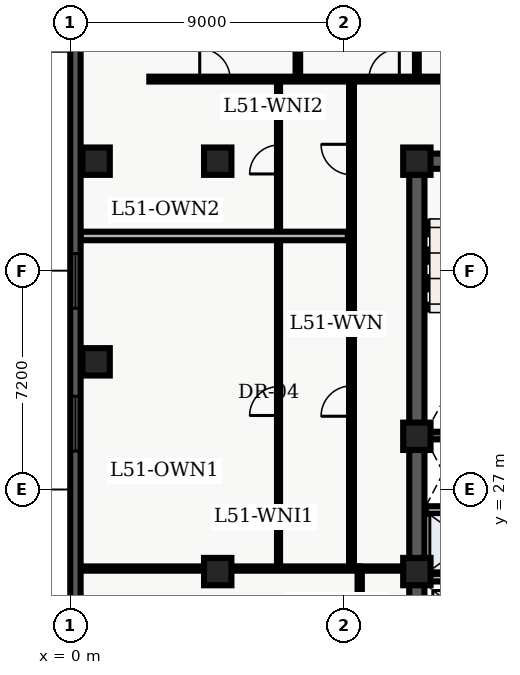
"""IFC4 building model, lengths in metres.
Left out: names, types, materials, properties, quantities, classifications, styles, units other than length and angle.
Written with IfcOpenShell. Run it as: python <this file> out.ifc"""

import sys

from ifc_helpers import new_model, entity, si_unit, converted_unit, direction, frame, origin_with_axes, origin_2d_with_axis, place, context, subcontext, project, spatial, polyline, rectangle, outline, extrude, element, fill, save


model = new_model("IFC4")
c1 = context("Model", 3, precision=1e-05, world=origin_with_axes(), true_north=direction((0.0, 1.0)))
c2 = subcontext(c1, "Body", "Model", "MODEL_VIEW")
j1 = project(units=[si_unit("LENGTHUNIT", "METRE"), converted_unit("PLANEANGLEUNIT", "DEGREE", entity("IfcPlaneAngleMeasure", 0.017), si_unit("PLANEANGLEUNIT", "RADIAN"), dimensions=[0, 0, 0, 0, 0, 0, 0])], contexts=[c1])
p1 = place(None, origin_with_axes())
s1 = spatial("IfcSite", under=j1, at=p1, CompositionType="ELEMENT")
p2 = place(p1, origin_with_axes())
s2 = spatial("IfcBuilding", under=s1, at=p2, CompositionType="ELEMENT")
p3 = place(p2, frame((0.0, 0.0, 208.2), z_axis=(0.0, 0.0, 1.0), x_axis=(1.0, 0.0, 0.0)))
s3 = spatial("IfcBuildingStorey", under=s2, at=p3, CompositionType="ELEMENT", Elevation=208.2)
p4 = place(p3, frame((11.4, 10.8, 0.0), z_axis=(0.0, 0.0, 1.0), x_axis=(0.0, 1.0, 0.0)))
e1 = element("IfcWall", 1, at=p4, inside=s3, PredefinedType="SHEAR", context=c2, shape_type="SweptSolid", body=[
    extrude(outline(polyline([(0.0, -0.25), (27.0, -0.25), (27.0, 0.25), (0.0, 0.25), (0.0, -0.25)])), origin_with_axes(), (0.0, 0.0, 1.0), 3.66),
])
p5 = place(p3, frame((11.4, 37.8, 0.0), z_axis=(0.0, 0.0, 1.0), x_axis=(1.0, 0.0, 0.0)))
e2 = element("IfcWall", 2, at=p5, inside=s3, PredefinedType="SHEAR", context=c2, shape_type="SweptSolid", body=[
    extrude(outline(polyline([(0.0, -0.25), (7.2, -0.25), (7.2, 0.25), (0.0, 0.25), (0.0, -0.25)])), origin_with_axes(), (0.0, 0.0, 1.0), 3.66),
])
p6 = place(p5, frame((2.625, 0.0, 0.0), z_axis=(0.0, 0.0, 1.0), x_axis=(1.0, 0.0, 0.0)))
e3 = element("IfcOpeningElement", 3, at=p6, cuts=e2, PredefinedType="OPENING", context=c2, shape_type="SweptSolid", body=[
    extrude(rectangle(XDim=1.05, YDim=0.52, at=origin_2d_with_axis()), origin_with_axes(), (0.0, 0.0, 1.0), 2.15),
])
p7 = place(p3, frame((11.65, 28.775, 0.0), z_axis=(0.0, 0.0, 1.0), x_axis=(1.0, 0.0, 0.0)))
e4 = element("IfcWall", 4, at=p7, inside=s3, PredefinedType="SHEAR", context=c2, shape_type="SweptSolid", body=[
    extrude(outline(polyline([(0.0, -0.125), (6.7, -0.125), (6.7, 0.125), (0.0, 0.125), (0.0, -0.125)])), origin_with_axes(), (0.0, 0.0, 1.0), 3.66),
])
p8 = place(p3, frame((11.7, 24.1, 0.0), z_axis=(0.0, 0.0, 1.0), x_axis=(1.0, 0.0, 0.0)))
e5 = element("IfcWall", 5, at=p8, inside=s3, PredefinedType="SOLIDWALL", context=c2, shape_type="SweptSolid", body=[
    extrude(outline(polyline([(0.0, -0.125), (6.6, -0.125), (6.6, 0.125), (0.0, 0.125), (0.0, -0.125)])), origin_with_axes(), (0.0, 0.0, 1.0), 2.7),
])
p9 = place(p8, frame((3.6, 0.0, 0.0), z_axis=(0.0, 0.0, 1.0), x_axis=(1.0, 0.0, 0.0)))
e6 = element("IfcOpeningElement", 6, at=p9, cuts=e5, PredefinedType="OPENING", context=c2, shape_type="SweptSolid", body=[
    extrude(rectangle(XDim=0.9, YDim=0.27, at=origin_2d_with_axis()), origin_with_axes(), (0.0, 0.0, 1.0), 2.15),
])
p10 = place(p8, frame((5.65, 0.0, 0.0), z_axis=(0.0, 0.0, 1.0), x_axis=(1.0, 0.0, 0.0)))
e7 = element("IfcOpeningElement", 7, at=p10, cuts=e5, PredefinedType="OPENING", context=c2, shape_type="SweptSolid", body=[
    extrude(rectangle(XDim=0.9, YDim=0.27, at=origin_2d_with_axis()), origin_with_axes(), (0.0, 0.0, 1.0), 2.15),
])
p11 = place(p3, frame((11.7, 26.325, 0.0), z_axis=(0.0, 0.0, 1.0), x_axis=(1.0, 0.0, 0.0)))
e8 = element("IfcWall", 8, at=p11, inside=s3, PredefinedType="SOLIDWALL", context=c2, shape_type="SweptSolid", body=[
    extrude(outline(polyline([(0.0, -0.125), (6.6, -0.125), (6.6, 0.125), (0.0, 0.125), (0.0, -0.125)])), origin_with_axes(), (0.0, 0.0, 1.0), 2.7),
])
p12 = place(p11, frame((3.5, 0.0, 0.0), z_axis=(0.0, 0.0, 1.0), x_axis=(1.0, 0.0, 0.0)))
e9 = element("IfcOpeningElement", 9, at=p12, cuts=e8, PredefinedType="OPENING", context=c2, shape_type="SweptSolid", body=[
    extrude(rectangle(XDim=0.9, YDim=0.27, at=origin_2d_with_axis()), origin_with_axes(), (0.0, 0.0, 1.0), 2.15),
])
for number, where, z_axis, x_axis in (
    (10, (11.4, 24.3, 0.0), (0.0, 0.0, 1.0), (1.0, 0.0, 0.0)),
    (11, (11.4, 28.75, 0.0), (0.0, 0.0, 1.0), (1.0, 0.0, 0.0)),
    (12, (11.4, 37.8, 0.0), (0.0, 0.0, 1.0), (1.0, 0.0, 0.0)),
    (13, (4.85, 24.3, 0.0), (0.0, 0.0, 1.0), (1.0, 0.0, 0.0)),
    (14, (4.85, 37.8, 0.0), (0.0, 0.0, 1.0), (1.0, 0.0, 0.0)),
    (15, (0.85, 31.2, 0.0), (0.0, 0.0, 1.0), (1.0, 0.0, 0.0)),
    (16, (0.85, 37.8, 0.0), (0.0, 0.0, 1.0), (1.0, 0.0, 0.0)),
):
    element("IfcColumn", number, at=place(p3, frame(where, z_axis=z_axis, x_axis=x_axis)), inside=s3, PredefinedType="COLUMN", context=c2, shape_type="SweptSolid", body=[
        extrude(rectangle(XDim=0.9, YDim=0.9, at=origin_2d_with_axis()), origin_with_axes(), (0.0, 0.0, 1.0), 3.9),
    ])
p13 = place(p3, frame((9.52, 20.4, 0.0), z_axis=(0.0, 0.0, 1.0), x_axis=(0.0, 1.0, 0.0)))
e17 = element("IfcWall", 17, at=p13, inside=s3, PredefinedType="PARTITIONING", context=c2, shape_type="SweptSolid", body=[
    extrude(outline(polyline([(0.0, -0.07), (4.0, -0.07), (4.0, 0.07), (0.0, 0.07), (0.0, -0.07)])), origin_with_axes(), (0.0, 0.0, 1.0), 2.7),
])
p14 = place(p3, frame((9.52, 24.4, 0.0), z_axis=(0.0, 0.0, 1.0), x_axis=(1.0, 0.0, 0.0)))
e18 = element("IfcWall", 18, at=p14, inside=s3, PredefinedType="PARTITIONING", context=c2, shape_type="SweptSolid", body=[
    extrude(outline(polyline([(0.0, -0.07), (1.58, -0.07), (1.58, 0.07), (0.0, 0.07), (0.0, -0.07)])), origin_with_axes(), (0.0, 0.0, 1.0), 2.7),
])
p15 = place(p3, frame((2.6, 40.5, 0.0), z_axis=(0.0, 0.0, 1.0), x_axis=(1.0, 0.0, 0.0)))
e19 = element("IfcWall", 19, at=p15, inside=s3, PredefinedType="PARTITIONING", context=c2, shape_type="SweptSolid", body=[
    extrude(outline(polyline([(0.0, -0.08), (27.751, -0.08), (27.751, 0.08), (0.0, 0.08), (0.0, -0.08)])), origin_with_axes(), (0.0, 0.0, 1.0), 2.7),
])
p16 = place(p15, frame((2.158, 0.0, 0.0), z_axis=(0.0, 0.0, 1.0), x_axis=(1.0, 0.0, 0.0)))
e20 = element("IfcOpeningElement", 20, at=p16, cuts=e19, PredefinedType="OPENING", context=c2, shape_type="SweptSolid", body=[
    extrude(rectangle(XDim=1.0, YDim=0.18, at=origin_2d_with_axis()), origin_with_axes(), (0.0, 0.0, 1.0), 2.15),
])
p17 = place(p15, frame((7.723, 0.0, 0.0), z_axis=(0.0, 0.0, 1.0), x_axis=(1.0, 0.0, 0.0)))
e21 = element("IfcOpeningElement", 21, at=p17, cuts=e19, PredefinedType="OPENING", context=c2, shape_type="SweptSolid", body=[
    extrude(rectangle(XDim=1.0, YDim=0.18, at=origin_2d_with_axis()), origin_with_axes(), (0.0, 0.0, 1.0), 2.15),
])
p18 = place(p15, frame((11.266, 0.0, 0.0), z_axis=(0.0, 0.0, 1.0), x_axis=(1.0, 0.0, 0.0)))
e22 = element("IfcOpeningElement", 22, at=p18, cuts=e19, PredefinedType="OPENING", context=c2, shape_type="SweptSolid", body=[
    extrude(rectangle(XDim=1.0, YDim=0.18, at=origin_2d_with_axis()), origin_with_axes(), (0.0, 0.0, 1.0), 2.15),
])
p19 = place(p15, frame((15.626, 0.0, 0.0), z_axis=(0.0, 0.0, 1.0), x_axis=(1.0, 0.0, 0.0)))
e23 = element("IfcOpeningElement", 23, at=p19, cuts=e19, PredefinedType="OPENING", context=c2, shape_type="SweptSolid", body=[
    extrude(rectangle(XDim=1.0, YDim=0.18, at=origin_2d_with_axis()), origin_with_axes(), (0.0, 0.0, 1.0), 2.15),
])
p20 = place(p3, frame((9.25, 24.4, 0.0), z_axis=(0.0, 0.0, 1.0), x_axis=(0.0, 1.0, 0.0)))
e24 = element("IfcWall", 24, at=p20, inside=s3, PredefinedType="PARTITIONING", context=c2, shape_type="SweptSolid", body=[
    extrude(outline(polyline([(0.0, -0.08), (16.1, -0.08), (16.1, 0.08), (0.0, 0.08), (0.0, -0.08)])), origin_with_axes(), (0.0, 0.0, 1.0), 2.7),
])
p21 = place(p20, frame((5.51, 0.0, 0.0), z_axis=(0.0, 0.0, 1.0), x_axis=(1.0, 0.0, 0.0)))
e25 = element("IfcOpeningElement", 25, at=p21, cuts=e24, PredefinedType="OPENING", context=c2, shape_type="SweptSolid", body=[
    extrude(rectangle(XDim=1.0, YDim=0.18, at=origin_2d_with_axis()), origin_with_axes(), (0.0, 0.0, 1.0), 2.15),
])
p22 = place(p20, frame((13.455, 0.0, 0.0), z_axis=(0.0, 0.0, 1.0), x_axis=(1.0, 0.0, 0.0)))
e26 = element("IfcOpeningElement", 26, at=p22, cuts=e24, PredefinedType="OPENING", context=c2, shape_type="SweptSolid", body=[
    extrude(rectangle(XDim=1.0, YDim=0.18, at=origin_2d_with_axis()), origin_with_axes(), (0.0, 0.0, 1.0), 2.15),
])
p23 = place(p3, frame((0.335, 24.4, 0.0), z_axis=(0.0, 0.0, 1.0), x_axis=(1.0, 0.0, 0.0)))
e27 = element("IfcWall", 27, at=p23, inside=s3, PredefinedType="PARTITIONING", context=c2, shape_type="SweptSolid", body=[
    extrude(outline(polyline([(0.0, -0.07), (9.185, -0.07), (9.185, 0.07), (0.0, 0.07), (0.0, -0.07)])), origin_with_axes(), (0.0, 0.0, 1.0), 2.7),
])
p24 = place(p3, frame((6.85, 24.55, 0.0), z_axis=(0.0, 0.0, 1.0), x_axis=(0.0, 1.0, 0.0)))
e28 = element("IfcWall", 28, at=p24, inside=s3, PredefinedType="PARTITIONING", context=c2, shape_type="SweptSolid", body=[
    extrude(outline(polyline([(0.0, -0.05), (15.75, -0.05), (15.75, 0.05), (0.0, 0.05), (0.0, -0.05)])), origin_with_axes(), (0.0, 0.0, 1.0), 2.7),
])
p25 = place(p24, frame((5.36, 0.0, 0.0), z_axis=(0.0, 0.0, 1.0), x_axis=(1.0, 0.0, 0.0)))
e29 = element("IfcOpeningElement", 29, at=p25, cuts=e28, PredefinedType="OPENING", context=c2, shape_type="SweptSolid", body=[
    extrude(rectangle(XDim=0.95, YDim=0.12, at=origin_2d_with_axis()), origin_with_axes(), (0.0, 0.0, 1.0), 2.15),
])
p26 = place(p24, frame((13.305, 0.0, 0.0), z_axis=(0.0, 0.0, 1.0), x_axis=(1.0, 0.0, 0.0)))
e30 = element("IfcOpeningElement", 30, at=p26, cuts=e28, PredefinedType="OPENING", context=c2, shape_type="SweptSolid", body=[
    extrude(rectangle(XDim=0.95, YDim=0.12, at=origin_2d_with_axis()), origin_with_axes(), (0.0, 0.0, 1.0), 2.15),
])
p27 = place(p3, frame((0.335, 35.34, 0.0), z_axis=(0.0, 0.0, 1.0), x_axis=(1.0, 0.0, 0.0)))
e31 = element("IfcWall", 31, at=p27, inside=s3, PredefinedType="PARTITIONING", context=c2, shape_type="SweptSolid", body=[
    extrude(outline(polyline([(0.0, -0.14), (8.795, -0.14), (8.795, 0.14), (0.0, 0.14), (0.0, -0.14)])), origin_with_axes(), (0.0, 0.0, 1.0), 2.7),
])
p28 = place(p3, frame((7.486, 40.6, 0.0), z_axis=(0.0, 0.0, 1.0), x_axis=(0.0, 1.0, 0.0)))
e32 = element("IfcWall", 32, at=p28, inside=s3, PredefinedType="PARTITIONING", context=c2, shape_type="SweptSolid", body=[
    extrude(outline(polyline([(0.0, -0.075), (7.665, -0.075), (7.665, 0.075), (0.0, 0.075), (0.0, -0.075)])), origin_with_axes(), (0.0, 0.0, 1.0), 2.7),
])
p29 = place(p3, frame((11.4, 40.6, 0.0), z_axis=(0.0, 0.0, 1.0), x_axis=(0.0, 1.0, 0.0)))
e33 = element("IfcWall", 33, at=p29, inside=s3, PredefinedType="PARTITIONING", context=c2, shape_type="SweptSolid", body=[
    extrude(outline(polyline([(0.0, -0.062), (7.665, -0.062), (7.665, 0.062), (0.0, 0.062), (0.0, -0.062)])), origin_with_axes(), (0.0, 0.0, 1.0), 2.7),
])
p30 = place(p3, frame((0.17, 2.74, 0.0), z_axis=(0.0, 0.0, 1.0), x_axis=(0.0, 1.0, 0.0)))
e34 = element("IfcWall", 34, at=p30, inside=s3, PredefinedType="SOLIDWALL", context=c2, shape_type="SweptSolid", body=[
    extrude(outline(polyline([(0.0, -0.17), (43.46, -0.17), (43.46, 0.17), (0.0, 0.17), (0.0, -0.17)])), origin_with_axes(), (0.0, 0.0, 1.0), 3.66),
])
p31 = place(p30, frame((2.948, 0.0, 0.45), z_axis=(0.0, 0.0, 1.0), x_axis=(1.0, 0.0, 0.0)))
e35 = element("IfcOpeningElement", 35, at=p31, cuts=e34, PredefinedType="OPENING", context=c2, shape_type="SweptSolid", body=[
    extrude(rectangle(XDim=1.8, YDim=0.36, at=origin_2d_with_axis()), origin_with_axes(), (0.0, 0.0, 1.0), 2.1),
])
p32 = place(p30, frame((12.339, 0.0, 0.45), z_axis=(0.0, 0.0, 1.0), x_axis=(1.0, 0.0, 0.0)))
e36 = element("IfcOpeningElement", 36, at=p32, cuts=e34, PredefinedType="OPENING", context=c2, shape_type="SweptSolid", body=[
    extrude(rectangle(XDim=1.8, YDim=0.36, at=origin_2d_with_axis()), origin_with_axes(), (0.0, 0.0, 1.0), 2.1),
])
p33 = place(p30, frame((26.426, 0.0, 0.45), z_axis=(0.0, 0.0, 1.0), x_axis=(1.0, 0.0, 0.0)))
e37 = element("IfcOpeningElement", 37, at=p33, cuts=e34, PredefinedType="OPENING", context=c2, shape_type="SweptSolid", body=[
    extrude(rectangle(XDim=1.8, YDim=0.36, at=origin_2d_with_axis()), origin_with_axes(), (0.0, 0.0, 1.0), 2.1),
])
p34 = place(p30, frame((31.121, 0.0, 0.45), z_axis=(0.0, 0.0, 1.0), x_axis=(1.0, 0.0, 0.0)))
e38 = element("IfcOpeningElement", 38, at=p34, cuts=e34, PredefinedType="OPENING", context=c2, shape_type="SweptSolid", body=[
    extrude(rectangle(XDim=1.8, YDim=0.36, at=origin_2d_with_axis()), origin_with_axes(), (0.0, 0.0, 1.0), 2.1),
])
p35 = place(p30, frame((40.062, 0.0, 0.45), z_axis=(0.0, 0.0, 1.0), x_axis=(1.0, 0.0, 0.0)))
e39 = element("IfcOpeningElement", 39, at=p35, cuts=e34, PredefinedType="OPENING", context=c2, shape_type="SweptSolid", body=[
    extrude(rectangle(XDim=1.8, YDim=0.36, at=origin_2d_with_axis()), origin_with_axes(), (0.0, 0.0, 1.0), 2.1),
])
p36 = place(p24, frame((5.36, 0.0, 0.0), z_axis=(0.0, 0.0, 1.0), x_axis=(1.0, 0.0, 0.0)))
e40 = element("IfcDoor", 40, at=p36, inside=s3, OperationType="SINGLE_SWING_LEFT", PredefinedType="DOOR", context=c2, shape_type="SweptSolid", body=[
    extrude(rectangle(XDim=0.95, YDim=0.06, at=origin_2d_with_axis()), origin_with_axes(), (0.0, 0.0, 1.0), 2.15),
])
fill(e29, e40)
p37 = place(p20, frame((5.51, 0.0, 0.0), z_axis=(0.0, 0.0, 1.0), x_axis=(1.0, 0.0, 0.0)))
e41 = element("IfcDoor", 41, at=p37, inside=s3, OperationType="SINGLE_SWING_LEFT", PredefinedType="DOOR", context=c2, shape_type="SweptSolid", body=[
    extrude(rectangle(XDim=1.0, YDim=0.09, at=origin_2d_with_axis()), origin_with_axes(), (0.0, 0.0, 1.0), 2.15),
])
fill(e25, e41)
p38 = place(p24, frame((13.305, 0.0, 0.0), z_axis=(0.0, 0.0, 1.0), x_axis=(1.0, 0.0, 0.0)))
e42 = element("IfcDoor", 42, at=p38, inside=s3, OperationType="SINGLE_SWING_LEFT", PredefinedType="DOOR", context=c2, shape_type="SweptSolid", body=[
    extrude(rectangle(XDim=0.95, YDim=0.06, at=origin_2d_with_axis()), origin_with_axes(), (0.0, 0.0, 1.0), 2.15),
])
fill(e30, e42)
p39 = place(p20, frame((13.455, 0.0, 0.0), z_axis=(0.0, 0.0, 1.0), x_axis=(1.0, 0.0, 0.0)))
e43 = element("IfcDoor", 43, at=p39, inside=s3, OperationType="SINGLE_SWING_RIGHT", PredefinedType="DOOR", context=c2, shape_type="SweptSolid", body=[
    extrude(rectangle(XDim=1.0, YDim=0.09, at=origin_2d_with_axis()), origin_with_axes(), (0.0, 0.0, 1.0), 2.15),
])
fill(e26, e43)
p40 = place(p15, frame((2.158, 0.0, 0.0), z_axis=(0.0, 0.0, 1.0), x_axis=(1.0, 0.0, 0.0)))
e44 = element("IfcDoor", 44, at=p40, inside=s3, OperationType="SINGLE_SWING_LEFT", PredefinedType="DOOR", context=c2, shape_type="SweptSolid", body=[
    extrude(rectangle(XDim=1.0, YDim=0.09, at=origin_2d_with_axis()), origin_with_axes(), (0.0, 0.0, 1.0), 2.15),
])
fill(e20, e44)
p41 = place(p15, frame((7.723, 0.0, 0.0), z_axis=(0.0, 0.0, 1.0), x_axis=(1.0, 0.0, 0.0)))
e45 = element("IfcDoor", 45, at=p41, inside=s3, OperationType="SINGLE_SWING_RIGHT", PredefinedType="DOOR", context=c2, shape_type="SweptSolid", body=[
    extrude(rectangle(XDim=1.0, YDim=0.09, at=origin_2d_with_axis()), origin_with_axes(), (0.0, 0.0, 1.0), 2.15),
])
fill(e21, e45)
p42 = place(p30, frame((26.426, 0.0, 0.45), z_axis=(0.0, 0.0, 1.0), x_axis=(1.0, 0.0, 0.0)))
e46 = element("IfcWindow", 46, at=p42, inside=s3, PredefinedType="WINDOW", context=c2, shape_type="SweptSolid", body=[
    extrude(rectangle(XDim=1.8, YDim=0.09, at=origin_2d_with_axis()), origin_with_axes(), (0.0, 0.0, 1.0), 2.1),
])
fill(e37, e46)
p43 = place(p30, frame((31.121, 0.0, 0.45), z_axis=(0.0, 0.0, 1.0), x_axis=(1.0, 0.0, 0.0)))
e47 = element("IfcWindow", 47, at=p43, inside=s3, PredefinedType="WINDOW", context=c2, shape_type="SweptSolid", body=[
    extrude(rectangle(XDim=1.8, YDim=0.09, at=origin_2d_with_axis()), origin_with_axes(), (0.0, 0.0, 1.0), 2.1),
])
fill(e38, e47)
save(model, sys.argv[1])
